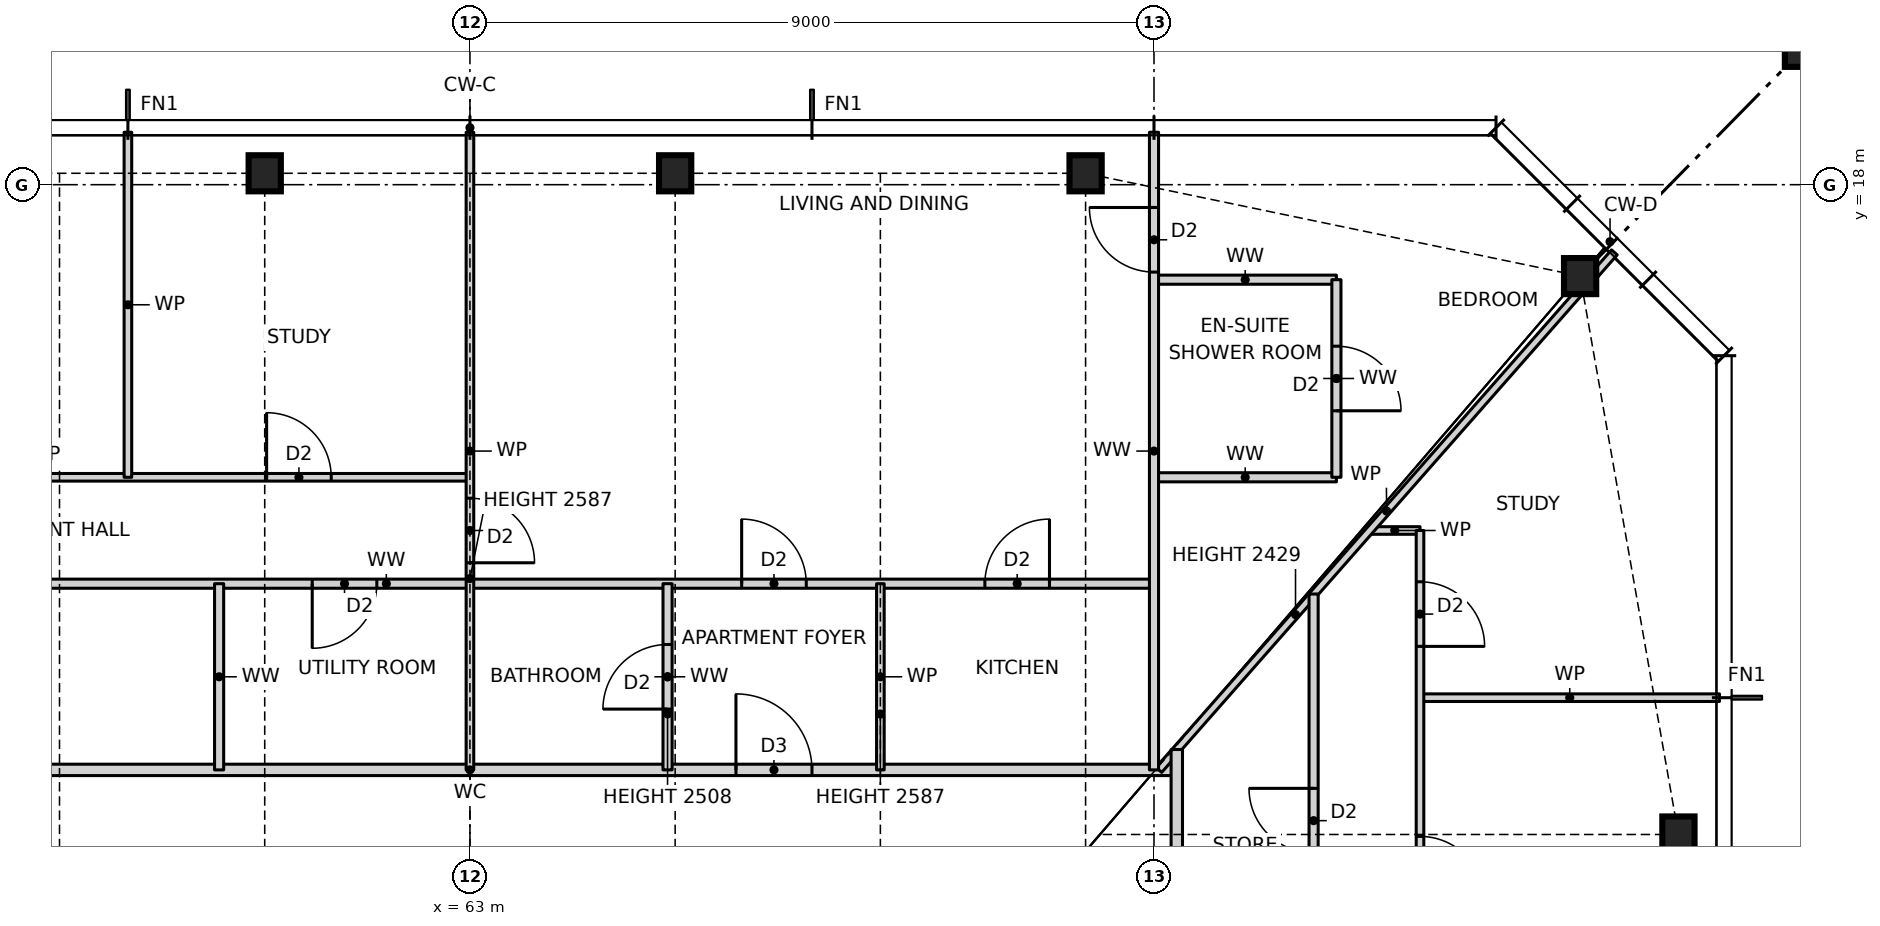
"""IFC4 building model, lengths in metres.
Left out: names, types, materials, properties, quantities, classifications, styles, units other than length and angle.
Written with IfcOpenShell. Run it as: python <this file> out.ifc"""

import sys

from ifc_helpers import new_model, si_unit, direction, frame, frame_2d, origin, origin_2d, place, context, subcontext, project, spatial, rectangle, hollow_rectangle, i_section, extrude, element, fill, save


model = new_model("IFC4")
c1 = context("Model", 3, precision=1e-05, world=origin(), true_north=direction((0.0, 1.0)))
c2 = subcontext(c1, "Body", "Model", "MODEL_VIEW")
j1 = project(units=[si_unit("LENGTHUNIT", "METRE"), si_unit("PLANEANGLEUNIT", "RADIAN")], contexts=[c1])
p1 = place(None, origin())
s1 = spatial("IfcSite", under=j1, at=p1, CompositionType="ELEMENT")
p2 = place(p1, origin())
s2 = spatial("IfcBuilding", under=s1, at=p2, CompositionType="ELEMENT")
p3 = place(p2, frame((0.0, 0.0, 57.0)))
s3 = spatial("IfcBuildingStorey", under=s2, at=p3, CompositionType="ELEMENT", Elevation=57.0)
for number, where, z_axis, x_axis in (
    (1, (78.9, 9.45, 0.0), (0.0, 0.0, 1.0), (1.0, 0.0, 0.0)),
    (2, (77.606, 16.797, 0.0), (0.0, 0.0, 1.0), (1.0, 0.0, 0.0)),
    (3, (71.1, 18.15, 0.0), (0.0, 0.0, 1.0), (1.0, 0.0, 0.0)),
    (4, (65.7, 18.15, 0.0), (0.0, 0.0, 1.0), (1.0, 0.0, 0.0)),
    (5, (60.3, 18.15, 0.0), (0.0, 0.0, 1.0), (1.0, 0.0, 0.0)),
):
    element("IfcColumn", number, at=place(p3, frame(where, z_axis=z_axis, x_axis=x_axis)), inside=s3, PredefinedType="COLUMN", context=c2, shape_type="SweptSolid", body=[
        extrude(i_section(OverallWidth=0.424, OverallDepth=0.475, WebThickness=0.048, FlangeThickness=0.077, at=origin_2d()), origin(), (0.0, 0.0, 1.0), 3.5),
    ])
p4 = place(p3, frame((80.9, 20.15, 0.0), z_axis=(0.0, 0.0, 1.0), x_axis=(1.0, 0.0, 0.0)))
e6 = element("IfcColumn", 6, at=p4, inside=s3, PredefinedType="COLUMN", context=c2, shape_type="SweptSolid", body=[
    extrude(hollow_rectangle(XDim=1.2, YDim=1.2, WallThickness=0.07, at=origin_2d()), origin(), (0.0, 0.0, 1.0), 3.5),
])
p5 = place(p3, frame((53.7, 10.3, 0.0), z_axis=(0.0, 0.0, 1.0), x_axis=(1.0, 0.0, 0.0)))
e7 = element("IfcWall", 7, at=p5, inside=s3, PredefinedType="PARTITIONING", context=c2, shape_type="SweptSolid", body=[
    extrude(rectangle(XDim=18.6, YDim=0.15, at=frame_2d((9.3, 0.0))), origin(), (0.0, 0.0, 1.0), 3.27),
])
p6 = place(p5, frame((12.8, 0.0, 0.0)))
e8 = element("IfcOpeningElement", 8, at=p6, cuts=e7, PredefinedType="OPENING", context=c2, shape_type="SweptSolid", body=[
    extrude(rectangle(XDim=1.0, YDim=2.1, at=frame_2d((0.5, 1.05))), frame((0.0, 0.085, 0.0), z_axis=(0.0, -1.0, 0.0), x_axis=(1.0, 0.0, 0.0)), (0.0, 0.0, 1.0), 0.17),
])
p7 = place(p3, frame((75.5, 11.25, 0.0), z_axis=(0.0, 0.0, 1.0), x_axis=(1.0, 0.0, 0.0)))
e9 = element("IfcWall", 9, at=p7, inside=s3, PredefinedType="PARTITIONING", context=c2, shape_type="SweptSolid", body=[
    extrude(rectangle(XDim=3.94, YDim=0.1, at=frame_2d((1.97, 0.0))), origin(), (0.0, 0.0, 1.0), 3.27),
])
p8 = place(p3, frame((51.8, 12.75, 0.0), z_axis=(0.0, 0.0, 1.0), x_axis=(1.0, 0.0, 0.0)))
e10 = element("IfcWall", 10, at=p8, inside=s3, PredefinedType="PARTITIONING", context=c2, shape_type="SweptSolid", body=[
    extrude(rectangle(XDim=20.2, YDim=0.12, at=frame_2d((10.1, 0.0))), origin(), (0.0, 0.0, 1.0), 3.27),
])
p9 = place(p8, frame((17.975, 0.0, 0.0)))
e11 = element("IfcOpeningElement", 11, at=p9, cuts=e10, PredefinedType="OPENING", context=c2, shape_type="SweptSolid", body=[
    extrude(rectangle(XDim=0.85, YDim=2.1, at=frame_2d((0.425, 1.05))), frame((0.0, 0.07, 0.0), z_axis=(0.0, -1.0, 0.0), x_axis=(1.0, 0.0, 0.0)), (0.0, 0.0, 1.0), 0.14),
])
p10 = place(p8, frame((14.775, 0.0, 0.0)))
e12 = element("IfcOpeningElement", 12, at=p10, cuts=e10, PredefinedType="OPENING", context=c2, shape_type="SweptSolid", body=[
    extrude(rectangle(XDim=0.85, YDim=2.1, at=frame_2d((0.425, 1.05))), frame((0.0, 0.07, 0.0), z_axis=(0.0, -1.0, 0.0), x_axis=(1.0, 0.0, 0.0)), (0.0, 0.0, 1.0), 0.14),
])
p11 = place(p8, frame((9.125, 0.0, 0.0)))
e13 = element("IfcOpeningElement", 13, at=p11, cuts=e10, PredefinedType="OPENING", context=c2, shape_type="SweptSolid", body=[
    extrude(rectangle(XDim=0.85, YDim=2.1, at=frame_2d((0.425, 1.05))), frame((0.0, 0.07, 0.0), z_axis=(0.0, -1.0, 0.0), x_axis=(1.0, 0.0, 0.0)), (0.0, 0.0, 1.0), 0.14),
])
p12 = place(p8, frame((3.525, 0.0, 0.0)))
e14 = element("IfcOpeningElement", 14, at=p12, cuts=e10, PredefinedType="OPENING", context=c2, shape_type="SweptSolid", body=[
    extrude(rectangle(XDim=0.85, YDim=2.1, at=frame_2d((0.425, 1.05))), frame((0.0, 0.07, 0.0), z_axis=(0.0, -1.0, 0.0), x_axis=(1.0, 0.0, 0.0)), (0.0, 0.0, 1.0), 0.14),
])
p13 = place(p3, frame((74.836, 13.45, 0.0), z_axis=(0.0, 0.0, 1.0), x_axis=(1.0, 0.0, 0.0)))
e15 = element("IfcWall", 15, at=p13, inside=s3, PredefinedType="PARTITIONING", context=c2, shape_type="SweptSolid", body=[
    extrude(rectangle(XDim=0.664, YDim=0.1, at=frame_2d((0.332, 0.0))), origin(), (0.0, 0.0, 1.0), 3.27),
])
p14 = place(p3, frame((51.8, 14.15, 0.0), z_axis=(0.0, 0.0, 1.0), x_axis=(1.0, 0.0, 0.0)))
e16 = element("IfcWall", 16, at=p14, inside=s3, PredefinedType="PARTITIONING", context=c2, shape_type="SweptSolid", body=[
    extrude(rectangle(XDim=11.2, YDim=0.1, at=frame_2d((5.6, 0.0))), origin(), (0.0, 0.0, 1.0), 3.27),
])
p15 = place(p14, frame((8.525, 0.0, 0.0)))
e17 = element("IfcOpeningElement", 17, at=p15, cuts=e16, PredefinedType="OPENING", context=c2, shape_type="SweptSolid", body=[
    extrude(rectangle(XDim=0.85, YDim=2.1, at=frame_2d((0.425, 1.05))), frame((0.0, 0.06, 0.0), z_axis=(0.0, -1.0, 0.0), x_axis=(1.0, 0.0, 0.0)), (0.0, 0.0, 1.0), 0.12),
])
p16 = place(p14, frame((4.025, 0.0, 0.0)))
e18 = element("IfcOpeningElement", 18, at=p16, cuts=e16, PredefinedType="OPENING", context=c2, shape_type="SweptSolid", body=[
    extrude(rectangle(XDim=0.85, YDim=2.1, at=frame_2d((0.425, 1.05))), frame((0.0, 0.06, 0.0), z_axis=(0.0, -1.0, 0.0), x_axis=(1.0, 0.0, 0.0)), (0.0, 0.0, 1.0), 0.12),
])
p17 = place(p14, frame((0.675, 0.0, 0.0)))
e19 = element("IfcOpeningElement", 19, at=p17, cuts=e16, PredefinedType="OPENING", context=c2, shape_type="SweptSolid", body=[
    extrude(rectangle(XDim=0.85, YDim=2.1, at=frame_2d((0.425, 1.05))), frame((0.0, 0.06, 0.0), z_axis=(0.0, -1.0, 0.0), x_axis=(1.0, 0.0, 0.0)), (0.0, 0.0, 1.0), 0.12),
])
for number, where, z_axis, x_axis in (
    (20, (72.0, 14.15, 0.0), (0.0, 0.0, 1.0), (1.0, 0.0, 0.0)),
    (21, (72.0, 16.75, 0.0), (0.0, 0.0, 1.0), (1.0, 0.0, 0.0)),
):
    element("IfcWall", number, at=place(p3, frame(where, z_axis=z_axis, x_axis=x_axis)), inside=s3, PredefinedType="PARTITIONING", context=c2, shape_type="SweptSolid", body=[
        extrude(rectangle(XDim=2.4, YDim=0.12, at=frame_2d((1.2, 0.0))), origin(), (0.0, 0.0, 1.0), 3.27),
    ])
p18 = place(p3, frame((72.064, 10.3, 0.0), z_axis=(0.0, 0.0, 1.0), x_axis=(0.660700699661, 0.750649442461, 0.0)))
e22 = element("IfcWall", 22, at=p18, inside=s3, PredefinedType="PARTITIONING", context=c2, shape_type="SweptSolid", body=[
    extrude(rectangle(XDim=9.071, YDim=0.1, at=frame_2d((4.535, 0.0))), origin(), (0.0, 0.0, 1.0), 2.429),
])
p19 = place(p3, frame((75.5, 2.25, 0.0), z_axis=(0.0, 0.0, 1.0), x_axis=(0.0, 1.0, 0.0)))
e23 = element("IfcWall", 23, at=p19, inside=s3, PredefinedType="PARTITIONING", context=c2, shape_type="SweptSolid", body=[
    extrude(rectangle(XDim=11.2, YDim=0.1, at=frame_2d((5.6, 0.0))), origin(), (0.0, 0.0, 1.0), 3.27),
])
p20 = place(p19, frame((1.825, 0.0, 0.0)))
e24 = element("IfcOpeningElement", 24, at=p20, cuts=e23, PredefinedType="OPENING", context=c2, shape_type="SweptSolid", body=[
    extrude(rectangle(XDim=0.85, YDim=2.1, at=frame_2d((0.425, 1.05))), frame((0.0, 0.06, 0.0), z_axis=(0.0, -1.0, 0.0), x_axis=(1.0, 0.0, 0.0)), (0.0, 0.0, 1.0), 0.12),
])
p21 = place(p19, frame((6.325, 0.0, 0.0)))
e25 = element("IfcOpeningElement", 25, at=p21, cuts=e23, PredefinedType="OPENING", context=c2, shape_type="SweptSolid", body=[
    extrude(rectangle(XDim=0.85, YDim=2.1, at=frame_2d((0.425, 1.05))), frame((0.0, 0.06, 0.0), z_axis=(0.0, -1.0, 0.0), x_axis=(1.0, 0.0, 0.0)), (0.0, 0.0, 1.0), 0.12),
])
p22 = place(p19, frame((9.675, 0.0, 0.0)))
e26 = element("IfcOpeningElement", 26, at=p22, cuts=e23, PredefinedType="OPENING", context=c2, shape_type="SweptSolid", body=[
    extrude(rectangle(XDim=0.85, YDim=2.1, at=frame_2d((0.425, 1.05))), frame((0.0, 0.06, 0.0), z_axis=(0.0, -1.0, 0.0), x_axis=(1.0, 0.0, 0.0)), (0.0, 0.0, 1.0), 0.12),
])
p23 = place(p3, frame((74.4, 14.15, 0.0), z_axis=(0.0, 0.0, 1.0), x_axis=(0.0, 1.0, 0.0)))
e27 = element("IfcWall", 27, at=p23, inside=s3, PredefinedType="PARTITIONING", context=c2, shape_type="SweptSolid", body=[
    extrude(rectangle(XDim=2.6, YDim=0.12, at=frame_2d((1.3, 0.0))), origin(), (0.0, 0.0, 1.0), 3.27),
])
p24 = place(p23, frame((0.875, 0.0, 0.0)))
e28 = element("IfcOpeningElement", 28, at=p24, cuts=e27, PredefinedType="OPENING", context=c2, shape_type="SweptSolid", body=[
    extrude(rectangle(XDim=0.85, YDim=2.1, at=frame_2d((0.425, 1.05))), frame((0.0, 0.07, 0.0), z_axis=(0.0, -1.0, 0.0), x_axis=(1.0, 0.0, 0.0)), (0.0, 0.0, 1.0), 0.14),
])
p25 = place(p3, frame((74.1, -12.614, 0.0), z_axis=(0.0, 0.0, 1.0), x_axis=(0.0, 1.0, 0.0)))
e29 = element("IfcWall", 29, at=p25, inside=s3, PredefinedType="PARTITIONING", context=c2, shape_type="SweptSolid", body=[
    extrude(rectangle(XDim=25.228, YDim=0.12, at=frame_2d((12.614, 0.0))), origin(), (0.0, 0.0, 1.0), 3.27),
])
p26 = place(p25, frame((7.239, 0.0, 0.0)))
e30 = element("IfcOpeningElement", 30, at=p26, cuts=e29, PredefinedType="OPENING", context=c2, shape_type="SweptSolid", body=[
    extrude(rectangle(XDim=0.85, YDim=2.1, at=frame_2d((0.425, 1.05))), frame((0.0, 0.07, 0.0), z_axis=(0.0, -1.0, 0.0), x_axis=(1.0, 0.0, 0.0)), (0.0, 0.0, 1.0), 0.14),
])
p27 = place(p25, frame((10.439, 0.0, 0.0)))
e31 = element("IfcOpeningElement", 31, at=p27, cuts=e29, PredefinedType="OPENING", context=c2, shape_type="SweptSolid", body=[
    extrude(rectangle(XDim=0.85, YDim=2.1, at=frame_2d((0.425, 1.05))), frame((0.0, 0.07, 0.0), z_axis=(0.0, -1.0, 0.0), x_axis=(1.0, 0.0, 0.0)), (0.0, 0.0, 1.0), 0.14),
])
p28 = place(p25, frame((2.507, 0.0, 0.0)))
e32 = element("IfcOpeningElement", 32, at=p28, cuts=e29, PredefinedType="OPENING", context=c2, shape_type="SweptSolid", body=[
    extrude(rectangle(XDim=0.85, YDim=2.1, at=frame_2d((0.425, 1.05))), frame((0.0, 0.07, 0.0), z_axis=(0.0, -1.0, 0.0), x_axis=(1.0, 0.0, 0.0)), (0.0, 0.0, 1.0), 0.14),
])
p29 = place(p25, frame((16.639, 0.0, 0.0)))
e33 = element("IfcOpeningElement", 33, at=p29, cuts=e29, PredefinedType="OPENING", context=c2, shape_type="SweptSolid", body=[
    extrude(rectangle(XDim=0.85, YDim=2.1, at=frame_2d((0.425, 1.05))), frame((0.0, 0.07, 0.0), z_axis=(0.0, -1.0, 0.0), x_axis=(1.0, 0.0, 0.0)), (0.0, 0.0, 1.0), 0.14),
])
p30 = place(p25, frame((21.821, 0.0, 0.0)))
e34 = element("IfcOpeningElement", 34, at=p30, cuts=e29, PredefinedType="OPENING", context=c2, shape_type="SweptSolid", body=[
    extrude(rectangle(XDim=0.85, YDim=2.1, at=frame_2d((0.425, 1.05))), frame((0.0, 0.07, 0.0), z_axis=(0.0, -1.0, 0.0), x_axis=(1.0, 0.0, 0.0)), (0.0, 0.0, 1.0), 0.14),
])
p31 = place(p3, frame((72.3, -10.9, 0.0), z_axis=(0.0, 0.0, 1.0), x_axis=(0.0, 1.0, 0.0)))
e35 = element("IfcWall", 35, at=p31, inside=s3, PredefinedType="PARTITIONING", context=c2, shape_type="SweptSolid", body=[
    extrude(rectangle(XDim=21.468, YDim=0.15, at=frame_2d((10.734, 0.0))), origin(), (0.0, 0.0, 1.0), 3.27),
])
p32 = place(p31, frame((8.65, 0.0, 0.0)))
e36 = element("IfcOpeningElement", 36, at=p32, cuts=e35, PredefinedType="OPENING", context=c2, shape_type="SweptSolid", body=[
    extrude(rectangle(XDim=1.0, YDim=2.1, at=frame_2d((0.5, 1.05))), frame((0.0, 0.085, 0.0), z_axis=(0.0, -1.0, 0.0), x_axis=(1.0, 0.0, 0.0)), (0.0, 0.0, 1.0), 0.17),
])
p33 = place(p3, frame((72.0, 10.3, 0.0), z_axis=(0.0, 0.0, 1.0), x_axis=(0.0, 1.0, 0.0)))
e37 = element("IfcWall", 37, at=p33, inside=s3, PredefinedType="PARTITIONING", context=c2, shape_type="SweptSolid", body=[
    extrude(rectangle(XDim=8.39, YDim=0.12, at=frame_2d((4.195, 0.0))), origin(), (0.0, 0.0, 1.0), 3.27),
])
p34 = place(p33, frame((6.55, 0.0, 0.0)))
e38 = element("IfcOpeningElement", 38, at=p34, cuts=e37, PredefinedType="OPENING", context=c2, shape_type="SweptSolid", body=[
    extrude(rectangle(XDim=0.85, YDim=2.1, at=frame_2d((0.425, 1.05))), frame((0.0, 0.07, 0.0), z_axis=(0.0, -1.0, 0.0), x_axis=(1.0, 0.0, 0.0)), (0.0, 0.0, 1.0), 0.14),
])
p35 = place(p3, frame((68.4, 10.3, 0.0), z_axis=(0.0, 0.0, 1.0), x_axis=(0.0, 1.0, 0.0)))
e39 = element("IfcWall", 39, at=p35, inside=s3, PredefinedType="PARTITIONING", context=c2, shape_type="SweptSolid", body=[
    extrude(rectangle(XDim=2.45, YDim=0.1, at=frame_2d((1.225, 0.0))), origin(), (0.0, 0.0, 1.0), 2.587),
])
p36 = place(p3, frame((65.6, 10.3, 0.0), z_axis=(0.0, 0.0, 1.0), x_axis=(0.0, 1.0, 0.0)))
e40 = element("IfcWall", 40, at=p36, inside=s3, PredefinedType="PARTITIONING", context=c2, shape_type="SweptSolid", body=[
    extrude(rectangle(XDim=2.45, YDim=0.12, at=frame_2d((1.225, 0.0))), origin(), (0.0, 0.0, 1.0), 2.508),
])
p37 = place(p36, frame((0.8, 0.0, 0.0)))
e41 = element("IfcOpeningElement", 41, at=p37, cuts=e40, PredefinedType="OPENING", context=c2, shape_type="SweptSolid", body=[
    extrude(rectangle(XDim=0.85, YDim=2.1, at=frame_2d((0.425, 1.05))), frame((0.0, 0.07, 0.0), z_axis=(0.0, -1.0, 0.0), x_axis=(1.0, 0.0, 0.0)), (0.0, 0.0, 1.0), 0.14),
])
p38 = place(p3, frame((63.0, 10.3, 0.0), z_axis=(0.0, 0.0, 1.0), x_axis=(0.0, 1.0, 0.0)))
e42 = element("IfcWall", 42, at=p38, inside=s3, PredefinedType="PARTITIONING", context=c2, shape_type="SweptSolid", body=[
    extrude(rectangle(XDim=8.39, YDim=0.1, at=frame_2d((4.195, 0.0))), origin(), (0.0, 0.0, 1.0), 2.587),
])
p39 = place(p38, frame((2.725, 0.0, 0.0)))
e43 = element("IfcOpeningElement", 43, at=p39, cuts=e42, PredefinedType="OPENING", context=c2, shape_type="SweptSolid", body=[
    extrude(rectangle(XDim=0.85, YDim=2.1, at=frame_2d((0.425, 1.05))), frame((0.0, 0.06, 0.0), z_axis=(0.0, -1.0, 0.0), x_axis=(1.0, 0.0, 0.0)), (0.0, 0.0, 1.0), 0.12),
])
p40 = place(p3, frame((59.7, 10.3, 0.0), z_axis=(0.0, 0.0, 1.0), x_axis=(0.0, 1.0, 0.0)))
e44 = element("IfcWall", 44, at=p40, inside=s3, PredefinedType="PARTITIONING", context=c2, shape_type="SweptSolid", body=[
    extrude(rectangle(XDim=2.45, YDim=0.12, at=frame_2d((1.225, 0.0))), origin(), (0.0, 0.0, 1.0), 3.27),
])
p41 = place(p3, frame((58.5, 14.15, 0.0), z_axis=(0.0, 0.0, 1.0), x_axis=(0.0, 1.0, 0.0)))
e45 = element("IfcWall", 45, at=p41, inside=s3, PredefinedType="PARTITIONING", context=c2, shape_type="SweptSolid", body=[
    extrude(rectangle(XDim=4.54, YDim=0.1, at=frame_2d((2.27, 0.0))), origin(), (0.0, 0.0, 1.0), 3.27),
])
p42 = place(p21, frame((0.85, 0.0, 0.0), z_axis=(0.0, 0.0, 1.0), x_axis=(-1.0, 0.0, 0.0)))
e46 = element("IfcDoor", 46, at=p42, inside=s3, OperationType="SINGLE_SWING_RIGHT", PredefinedType="DOOR", context=c2, shape_type="SweptSolid", body=[
    extrude(rectangle(XDim=0.85, YDim=2.1, at=frame_2d((0.425, 1.05))), frame((0.0, 0.025, 0.0), z_axis=(0.0, -1.0, 0.0), x_axis=(1.0, 0.0, 0.0)), (0.0, 0.0, 1.0), 0.05),
])
fill(e25, e46)
p43 = place(p22, frame((0.85, 0.0, 0.0), z_axis=(0.0, 0.0, 1.0), x_axis=(-1.0, 0.0, 0.0)))
e47 = element("IfcDoor", 47, at=p43, inside=s3, OperationType="SINGLE_SWING_RIGHT", PredefinedType="DOOR", context=c2, shape_type="SweptSolid", body=[
    extrude(rectangle(XDim=0.85, YDim=2.1, at=frame_2d((0.425, 1.05))), frame((0.0, 0.025, 0.0), z_axis=(0.0, -1.0, 0.0), x_axis=(1.0, 0.0, 0.0)), (0.0, 0.0, 1.0), 0.05),
])
fill(e26, e47)
p44 = place(p30, origin())
e48 = element("IfcDoor", 48, at=p44, inside=s3, OperationType="SINGLE_SWING_RIGHT", PredefinedType="DOOR", context=c2, shape_type="SweptSolid", body=[
    extrude(rectangle(XDim=0.85, YDim=2.1, at=frame_2d((0.425, 1.05))), frame((0.0, 0.025, 0.0), z_axis=(0.0, -1.0, 0.0), x_axis=(1.0, 0.0, 0.0)), (0.0, 0.0, 1.0), 0.05),
])
fill(e34, e48)
p45 = place(p9, origin())
e49 = element("IfcDoor", 49, at=p45, inside=s3, OperationType="SINGLE_SWING_RIGHT", PredefinedType="DOOR", context=c2, shape_type="SweptSolid", body=[
    extrude(rectangle(XDim=0.85, YDim=2.1, at=frame_2d((0.425, 1.05))), frame((0.0, 0.025, 0.0), z_axis=(0.0, -1.0, 0.0), x_axis=(1.0, 0.0, 0.0)), (0.0, 0.0, 1.0), 0.05),
])
fill(e11, e49)
p46 = place(p6, origin())
e50 = element("IfcDoor", 50, at=p46, inside=s3, OperationType="SINGLE_SWING_LEFT", PredefinedType="DOOR", context=c2, shape_type="SweptSolid", body=[
    extrude(rectangle(XDim=1.0, YDim=2.1, at=frame_2d((0.5, 1.05))), frame((0.0, 0.025, 0.0), z_axis=(0.0, -1.0, 0.0), x_axis=(1.0, 0.0, 0.0)), (0.0, 0.0, 1.0), 0.05),
])
fill(e8, e50)
p47 = place(p10, origin())
e51 = element("IfcDoor", 51, at=p47, inside=s3, OperationType="SINGLE_SWING_LEFT", PredefinedType="DOOR", context=c2, shape_type="SweptSolid", body=[
    extrude(rectangle(XDim=0.85, YDim=2.1, at=frame_2d((0.425, 1.05))), frame((0.0, 0.025, 0.0), z_axis=(0.0, -1.0, 0.0), x_axis=(1.0, 0.0, 0.0)), (0.0, 0.0, 1.0), 0.05),
])
fill(e12, e51)
p48 = place(p37, origin())
e52 = element("IfcDoor", 52, at=p48, inside=s3, OperationType="SINGLE_SWING_LEFT", PredefinedType="DOOR", context=c2, shape_type="SweptSolid", body=[
    extrude(rectangle(XDim=0.85, YDim=2.1, at=frame_2d((0.425, 1.05))), frame((0.0, 0.025, 0.0), z_axis=(0.0, -1.0, 0.0), x_axis=(1.0, 0.0, 0.0)), (0.0, 0.0, 1.0), 0.05),
])
fill(e41, e52)
p49 = place(p24, frame((0.85, 0.0, 0.0), z_axis=(0.0, 0.0, 1.0), x_axis=(-1.0, 0.0, 0.0)))
e53 = element("IfcDoor", 53, at=p49, inside=s3, OperationType="SINGLE_SWING_RIGHT", PredefinedType="DOOR", context=c2, shape_type="SweptSolid", body=[
    extrude(rectangle(XDim=0.85, YDim=2.1, at=frame_2d((0.425, 1.05))), frame((0.0, 0.025, 0.0), z_axis=(0.0, -1.0, 0.0), x_axis=(1.0, 0.0, 0.0)), (0.0, 0.0, 1.0), 0.05),
])
fill(e28, e53)
p50 = place(p34, origin())
e54 = element("IfcDoor", 54, at=p50, inside=s3, OperationType="SINGLE_SWING_RIGHT", PredefinedType="DOOR", context=c2, shape_type="SweptSolid", body=[
    extrude(rectangle(XDim=0.85, YDim=2.1, at=frame_2d((0.425, 1.05))), frame((0.0, 0.025, 0.0), z_axis=(0.0, -1.0, 0.0), x_axis=(1.0, 0.0, 0.0)), (0.0, 0.0, 1.0), 0.05),
])
fill(e38, e54)
p51 = place(p39, frame((0.85, 0.0, 0.0), z_axis=(0.0, 0.0, 1.0), x_axis=(-1.0, 0.0, 0.0)))
e55 = element("IfcDoor", 55, at=p51, inside=s3, OperationType="SINGLE_SWING_RIGHT", PredefinedType="DOOR", context=c2, shape_type="SweptSolid", body=[
    extrude(rectangle(XDim=0.85, YDim=2.1, at=frame_2d((0.425, 1.05))), frame((0.0, 0.025, 0.0), z_axis=(0.0, -1.0, 0.0), x_axis=(1.0, 0.0, 0.0)), (0.0, 0.0, 1.0), 0.05),
])
fill(e43, e55)
p52 = place(p15, origin())
e56 = element("IfcDoor", 56, at=p52, inside=s3, OperationType="SINGLE_SWING_LEFT", PredefinedType="DOOR", context=c2, shape_type="SweptSolid", body=[
    extrude(rectangle(XDim=0.85, YDim=2.1, at=frame_2d((0.425, 1.05))), frame((0.0, 0.025, 0.0), z_axis=(0.0, -1.0, 0.0), x_axis=(1.0, 0.0, 0.0)), (0.0, 0.0, 1.0), 0.05),
])
fill(e17, e56)
p53 = place(p11, frame((0.85, 0.0, 0.0), z_axis=(0.0, 0.0, 1.0), x_axis=(-1.0, 0.0, 0.0)))
e57 = element("IfcDoor", 57, at=p53, inside=s3, OperationType="SINGLE_SWING_RIGHT", PredefinedType="DOOR", context=c2, shape_type="SweptSolid", body=[
    extrude(rectangle(XDim=0.85, YDim=2.1, at=frame_2d((0.425, 1.05))), frame((0.0, 0.025, 0.0), z_axis=(0.0, -1.0, 0.0), x_axis=(1.0, 0.0, 0.0)), (0.0, 0.0, 1.0), 0.05),
])
fill(e13, e57)
save(model, sys.argv[1])
